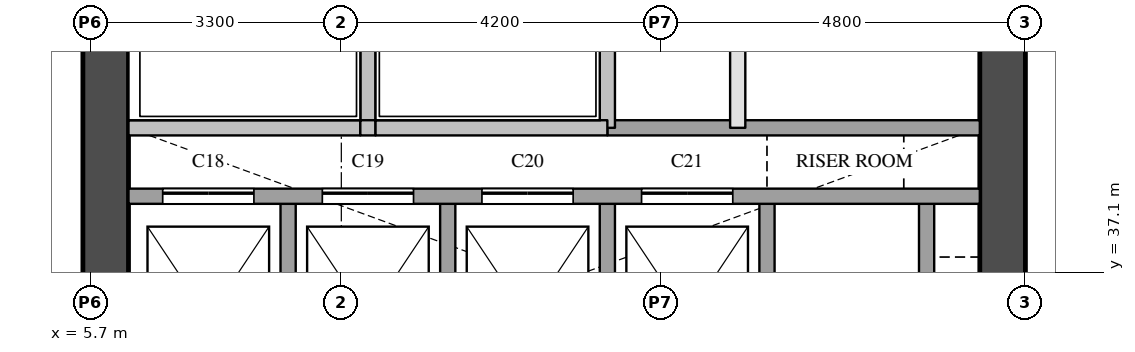
"""IFC4 building model, lengths in metres.
Left out: names, types, materials, properties, quantities, classifications, styles, units other than length and angle.
Written with IfcOpenShell. Run it as: python <this file> out.ifc"""

import sys

from ifc_helpers import new_model, si_unit, direction, frame, frame_2d, origin, place, context, subcontext, project, spatial, rectangle, extrude, element, fill, save


model = new_model("IFC4")
c1 = context("Model", 3, precision=1e-05, world=origin(), true_north=direction((0.0, 1.0)))
c2 = subcontext(c1, "Body", "Model", "MODEL_VIEW")
j1 = project(units=[si_unit("LENGTHUNIT", "METRE"), si_unit("PLANEANGLEUNIT", "RADIAN")], contexts=[c1])
p1 = place(None, origin())
s1 = spatial("IfcSite", under=j1, at=p1, CompositionType="ELEMENT")
p2 = place(p1, origin())
s2 = spatial("IfcBuilding", under=s1, at=p2, CompositionType="ELEMENT")
p3 = place(p2, frame((0.0, 0.0, 46.2)))
s3 = spatial("IfcBuildingStorey", under=s2, at=p3, CompositionType="ELEMENT", Elevation=46.2)
p4 = place(p3, frame((5.9, 29.1, 0.0), z_axis=(0.0, 0.0, 1.0), x_axis=(0.0, 1.0, 0.0)))
e1 = element("IfcWall", 1, at=p4, inside=s3, PredefinedType="SHEAR", context=c2, shape_type="SweptSolid", body=[
    extrude(rectangle(XDim=20.3, YDim=0.6, at=frame_2d((10.15, 0.0))), origin(), (0.0, 0.0, 1.0), 3.5),
])
p5 = place(p4, frame((3.6, 0.0, 0.0)))
e2 = element("IfcOpeningElement", 2, at=p5, cuts=e1, PredefinedType="OPENING", context=c2, shape_type="SweptSolid", body=[
    extrude(rectangle(XDim=1.8, YDim=2.1, at=frame_2d((0.9, 1.05))), frame((0.0, 0.31, 0.0), z_axis=(0.0, -1.0, 0.0), x_axis=(1.0, 0.0, 0.0)), (0.0, 0.0, 1.0), 0.62),
])
p6 = place(p4, frame((16.4, 0.0, 0.0)))
e3 = element("IfcOpeningElement", 3, at=p6, cuts=e1, PredefinedType="OPENING", context=c2, shape_type="SweptSolid", body=[
    extrude(rectangle(XDim=1.0, YDim=2.1, at=frame_2d((0.5, 1.05))), frame((0.0, 0.31, 0.0), z_axis=(0.0, -1.0, 0.0), x_axis=(1.0, 0.0, 0.0)), (0.0, 0.0, 1.0), 0.62),
])
p7 = place(p3, frame((17.7, 29.1, 0.0), z_axis=(0.0, 0.0, 1.0), x_axis=(0.0, 1.0, 0.0)))
e4 = element("IfcWall", 4, at=p7, inside=s3, PredefinedType="SHEAR", context=c2, shape_type="SweptSolid", body=[
    extrude(rectangle(XDim=20.3, YDim=0.6, at=frame_2d((10.15, 0.0))), origin(), (0.0, 0.0, 1.0), 3.5),
])
p8 = place(p7, frame((1.25, 0.0, 0.0)))
e5 = element("IfcOpeningElement", 5, at=p8, cuts=e4, PredefinedType="OPENING", context=c2, shape_type="SweptSolid", body=[
    extrude(rectangle(XDim=0.7, YDim=2.1, at=frame_2d((0.35, 1.05))), frame((0.0, 0.31, 0.0), z_axis=(0.0, -1.0, 0.0), x_axis=(1.0, 0.0, 0.0)), (0.0, 0.0, 1.0), 0.62),
])
p9 = place(p7, frame((7.05, 0.0, 0.0)))
e6 = element("IfcOpeningElement", 6, at=p9, cuts=e4, PredefinedType="OPENING", context=c2, shape_type="SweptSolid", body=[
    extrude(rectangle(XDim=0.7, YDim=2.1, at=frame_2d((0.35, 1.05))), frame((0.0, 0.31, 0.0), z_axis=(0.0, -1.0, 0.0), x_axis=(1.0, 0.0, 0.0)), (0.0, 0.0, 1.0), 0.62),
])
p10 = place(p3, frame((8.3, 34.9, 0.0), z_axis=(0.0, 0.0, 1.0), x_axis=(0.0, 1.0, 0.0)))
e7 = element("IfcWall", 7, at=p10, inside=s3, PredefinedType="SOLIDWALL", context=c2, shape_type="SweptSolid", body=[
    extrude(rectangle(XDim=3.2, YDim=0.2, at=frame_2d((1.6, 0.0))), origin(), (0.0, 0.0, 1.0), 3.5),
])
p11 = place(p3, frame((9.35, 39.0, 0.0), z_axis=(0.0, 0.0, 1.0), x_axis=(0.0, 1.0, 0.0)))
e8 = element("IfcWall", 8, at=p11, inside=s3, PredefinedType="SOLIDWALL", context=c2, shape_type="SweptSolid", body=[
    extrude(rectangle(XDim=1.9, YDim=0.2, at=frame_2d((0.95, 0.0))), origin(), (0.0, 0.0, 1.0), 3.5),
])
for number, where, z_axis, x_axis in (
    (9, (10.4, 34.9, 0.0), (0.0, 0.0, 1.0), (0.0, 1.0, 0.0)),
    (10, (12.5, 34.9, 0.0), (0.0, 0.0, 1.0), (0.0, 1.0, 0.0)),
):
    element("IfcWall", number, at=place(p3, frame(where, z_axis=z_axis, x_axis=x_axis)), inside=s3, PredefinedType="SOLIDWALL", context=c2, shape_type="SweptSolid", body=[
        extrude(rectangle(XDim=3.2, YDim=0.2, at=frame_2d((1.6, 0.0))), origin(), (0.0, 0.0, 1.0), 3.5),
    ])
p12 = place(p3, frame((12.5, 39.0, 0.0), z_axis=(0.0, 0.0, 1.0), x_axis=(0.0, 1.0, 0.0)))
e11 = element("IfcWall", 11, at=p12, inside=s3, PredefinedType="SOLIDWALL", context=c2, shape_type="SweptSolid", body=[
    extrude(rectangle(XDim=1.9, YDim=0.2, at=frame_2d((0.95, 0.0))), origin(), (0.0, 0.0, 1.0), 3.5),
])
p13 = place(p3, frame((14.215, 39.0, 0.0), z_axis=(0.0, 0.0, 1.0), x_axis=(0.0, 1.0, 0.0)))
e12 = element("IfcWall", 12, at=p13, inside=s3, PredefinedType="PARTITIONING", context=c2, shape_type="SweptSolid", body=[
    extrude(rectangle(XDim=6.2, YDim=0.2, at=frame_2d((3.1, 0.0))), origin(), (0.0, 0.0, 1.0), 3.5),
])
for number, where, z_axis, x_axis in (
    (13, (14.6, 34.9, 0.0), (0.0, 0.0, 1.0), (0.0, 1.0, 0.0)),
    (14, (16.7, 34.9, 0.0), (0.0, 0.0, 1.0), (0.0, 1.0, 0.0)),
):
    element("IfcWall", number, at=place(p3, frame(where, z_axis=z_axis, x_axis=x_axis)), inside=s3, PredefinedType="SOLIDWALL", context=c2, shape_type="SweptSolid", body=[
        extrude(rectangle(XDim=3.2, YDim=0.2, at=frame_2d((1.6, 0.0))), origin(), (0.0, 0.0, 1.0), 3.5),
    ])
p14 = place(p3, frame((6.2, 38.1, 0.0), z_axis=(0.0, 0.0, 1.0), x_axis=(1.0, 0.0, 0.0)))
e15 = element("IfcWall", 15, at=p14, inside=s3, PredefinedType="SOLIDWALL", context=c2, shape_type="SweptSolid", body=[
    extrude(rectangle(XDim=11.2, YDim=0.2, at=frame_2d((5.6, 0.0))), origin(), (0.0, 0.0, 1.0), 3.5),
])
p15 = place(p14, frame((0.45, 0.0, 0.0)))
e16 = element("IfcOpeningElement", 16, at=p15, cuts=e15, PredefinedType="OPENING", context=c2, shape_type="SweptSolid", body=[
    extrude(rectangle(XDim=1.2, YDim=2.1, at=frame_2d((0.6, 1.05))), frame((0.0, 0.11, 0.0), z_axis=(0.0, -1.0, 0.0), x_axis=(1.0, 0.0, 0.0)), (0.0, 0.0, 1.0), 0.22),
])
p16 = place(p14, frame((2.55, 0.0, 0.0)))
e17 = element("IfcOpeningElement", 17, at=p16, cuts=e15, PredefinedType="OPENING", context=c2, shape_type="SweptSolid", body=[
    extrude(rectangle(XDim=1.2, YDim=2.1, at=frame_2d((0.6, 1.05))), frame((0.0, 0.11, 0.0), z_axis=(0.0, -1.0, 0.0), x_axis=(1.0, 0.0, 0.0)), (0.0, 0.0, 1.0), 0.22),
])
p17 = place(p14, frame((4.65, 0.0, 0.0)))
e18 = element("IfcOpeningElement", 18, at=p17, cuts=e15, PredefinedType="OPENING", context=c2, shape_type="SweptSolid", body=[
    extrude(rectangle(XDim=1.2, YDim=2.1, at=frame_2d((0.6, 1.05))), frame((0.0, 0.11, 0.0), z_axis=(0.0, -1.0, 0.0), x_axis=(1.0, 0.0, 0.0)), (0.0, 0.0, 1.0), 0.22),
])
p18 = place(p14, frame((6.75, 0.0, 0.0)))
e19 = element("IfcOpeningElement", 19, at=p18, cuts=e15, PredefinedType="OPENING", context=c2, shape_type="SweptSolid", body=[
    extrude(rectangle(XDim=1.2, YDim=2.1, at=frame_2d((0.6, 1.05))), frame((0.0, 0.11, 0.0), z_axis=(0.0, -1.0, 0.0), x_axis=(1.0, 0.0, 0.0)), (0.0, 0.0, 1.0), 0.22),
])
p19 = place(p3, frame((12.5, 39.0, 0.0), z_axis=(0.0, 0.0, 1.0), x_axis=(1.0, 0.0, 0.0)))
e20 = element("IfcWall", 20, at=p19, inside=s3, PredefinedType="SOLIDWALL", context=c2, shape_type="SweptSolid", body=[
    extrude(rectangle(XDim=4.9, YDim=0.2, at=frame_2d((2.45, 0.0))), origin(), (0.0, 0.0, 1.0), 3.5),
])
p20 = place(p3, frame((6.2, 39.0, 0.0), z_axis=(0.0, 0.0, 1.0), x_axis=(1.0, 0.0, 0.0)))
e21 = element("IfcWall", 21, at=p20, inside=s3, PredefinedType="SOLIDWALL", context=c2, shape_type="SweptSolid", body=[
    extrude(rectangle(XDim=3.05, YDim=0.2, at=frame_2d((1.525, 0.0))), origin(), (0.0, 0.0, 1.0), 3.5),
])
p21 = place(p3, frame((9.25, 39.0, 0.0), z_axis=(0.0, 0.0, 1.0), x_axis=(1.0, 0.0, 0.0)))
e22 = element("IfcWall", 22, at=p21, inside=s3, PredefinedType="SOLIDWALL", context=c2, shape_type="SweptSolid", body=[
    extrude(rectangle(XDim=0.2, YDim=0.2, at=frame_2d((0.1, 0.0))), origin(), (0.0, 0.0, 1.0), 3.5),
])
p22 = place(p3, frame((9.45, 39.0, 0.0), z_axis=(0.0, 0.0, 1.0), x_axis=(1.0, 0.0, 0.0)))
e23 = element("IfcWall", 23, at=p22, inside=s3, PredefinedType="SOLIDWALL", context=c2, shape_type="SweptSolid", body=[
    extrude(rectangle(XDim=3.05, YDim=0.2, at=frame_2d((1.525, 0.0))), origin(), (0.0, 0.0, 1.0), 3.5),
])
p23 = place(p15, origin())
e24 = element("IfcDoor", 24, at=p23, inside=s3, OperationType="SLIDING_TO_LEFT", PredefinedType="DOOR", context=c2, shape_type="SweptSolid", body=[
    extrude(rectangle(XDim=1.2, YDim=2.1, at=frame_2d((0.6, 1.05))), frame((0.0, 0.025, 0.0), z_axis=(0.0, -1.0, 0.0), x_axis=(1.0, 0.0, 0.0)), (0.0, 0.0, 1.0), 0.05),
])
fill(e16, e24)
p24 = place(p16, origin())
e25 = element("IfcDoor", 25, at=p24, inside=s3, OperationType="SLIDING_TO_LEFT", PredefinedType="DOOR", context=c2, shape_type="SweptSolid", body=[
    extrude(rectangle(XDim=1.2, YDim=2.1, at=frame_2d((0.6, 1.05))), frame((0.0, 0.025, 0.0), z_axis=(0.0, -1.0, 0.0), x_axis=(1.0, 0.0, 0.0)), (0.0, 0.0, 1.0), 0.05),
])
fill(e17, e25)
p25 = place(p17, origin())
e26 = element("IfcDoor", 26, at=p25, inside=s3, OperationType="SLIDING_TO_LEFT", PredefinedType="DOOR", context=c2, shape_type="SweptSolid", body=[
    extrude(rectangle(XDim=1.2, YDim=2.1, at=frame_2d((0.6, 1.05))), frame((0.0, 0.025, 0.0), z_axis=(0.0, -1.0, 0.0), x_axis=(1.0, 0.0, 0.0)), (0.0, 0.0, 1.0), 0.05),
])
fill(e18, e26)
p26 = place(p18, origin())
e27 = element("IfcDoor", 27, at=p26, inside=s3, OperationType="SLIDING_TO_LEFT", PredefinedType="DOOR", context=c2, shape_type="SweptSolid", body=[
    extrude(rectangle(XDim=1.2, YDim=2.1, at=frame_2d((0.6, 1.05))), frame((0.0, 0.025, 0.0), z_axis=(0.0, -1.0, 0.0), x_axis=(1.0, 0.0, 0.0)), (0.0, 0.0, 1.0), 0.05),
])
fill(e19, e27)
save(model, sys.argv[1])
